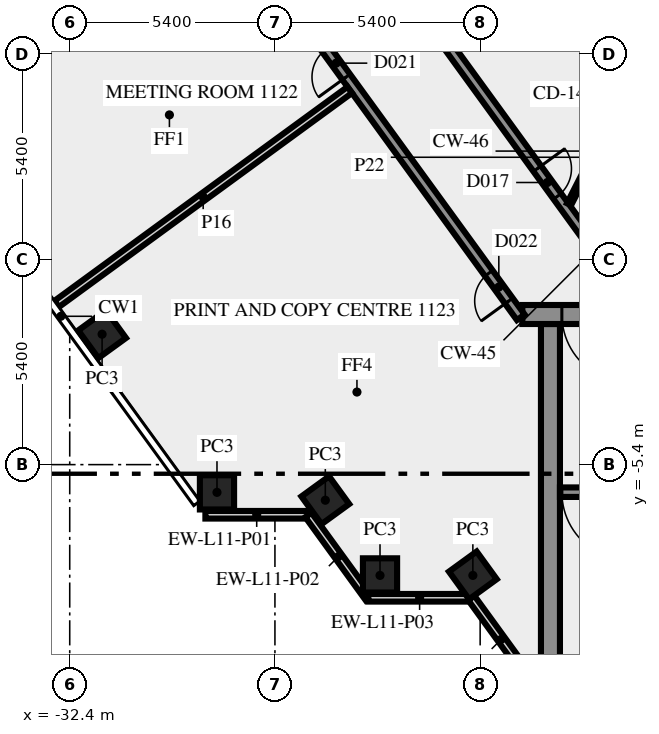
"""IFC4 building model, lengths in metres.
Left out: names, types, materials, properties, quantities, classifications, styles, units other than length and angle.
Written with IfcOpenShell. Run it as: python <this file> out.ifc"""

import sys

from ifc_helpers import new_model, si_unit, direction, frame, frame_2d, origin, origin_2d, place, context, subcontext, project, spatial, rectangle, extrude, element, fill, save


model = new_model("IFC4")
c1 = context("Model", 3, precision=1e-05, world=origin(), true_north=direction((0.0, 1.0)))
c2 = subcontext(c1, "Body", "Model", "MODEL_VIEW")
j1 = project(units=[si_unit("LENGTHUNIT", "METRE"), si_unit("PLANEANGLEUNIT", "RADIAN")], contexts=[c1])
p1 = place(None, origin())
s1 = spatial("IfcSite", under=j1, at=p1, CompositionType="ELEMENT")
p2 = place(p1, origin())
s2 = spatial("IfcBuilding", under=s1, at=p2, CompositionType="ELEMENT")
p3 = place(p2, frame((0.0, 0.0, 51.0)))
s3 = spatial("IfcBuildingStorey", under=s2, at=p3, CompositionType="ELEMENT", Elevation=51.0)
for number, where, z_axis, x_axis in (
    (1, (-31.548, -1.969, 0.0), (0.0, 0.0, 1.0), (0.588, -0.809, 0.0)),
    (2, (-28.525, -6.13, 0.0), (0.0, 0.0, 1.0), (1.0, 0.0, 0.0)),
    (3, (-25.674, -6.337, 0.0), (0.0, 0.0, 1.0), (0.588, -0.809, 0.0)),
    (4, (-24.235, -8.315, 0.0), (0.0, 0.0, 1.0), (1.0, 0.0, 0.0)),
    (5, (-21.792, -8.315, 0.0), (0.0, 0.0, 1.0), (0.588, -0.809, 0.0)),
):
    element("IfcColumn", number, at=place(p3, frame(where, z_axis=z_axis, x_axis=x_axis)), inside=s3, PredefinedType="COLUMN", context=c2, shape_type="SweptSolid", body=[
        extrude(rectangle(XDim=0.9, YDim=0.9, at=origin_2d()), origin(), (0.0, 0.0, 1.0), 3.65),
    ])
p4 = place(p3, frame((-28.83, -6.719, 0.0), z_axis=(0.0, 0.0, 1.0), x_axis=(1.0, 0.0, 0.0)))
e6 = element("IfcWall", 6, at=p4, inside=s3, PredefinedType="SOLIDWALL", context=c2, shape_type="SweptSolid", body=[
    extrude(rectangle(XDim=2.7, YDim=0.2, at=frame_2d((1.35, 0.0))), origin(), (0.0, 0.0, 1.0), 3.65),
])
p5 = place(p3, frame((-26.12, -6.724, 0.0), z_axis=(0.0, 0.0, 1.0), x_axis=(0.587720002413, -0.809064397168, 0.0)))
e7 = element("IfcWall", 7, at=p5, inside=s3, PredefinedType="SOLIDWALL", context=c2, shape_type="SweptSolid", body=[
    extrude(rectangle(XDim=2.7, YDim=0.2, at=frame_2d((1.35, 0.0))), origin(), (0.0, 0.0, 1.0), 3.65),
])
p6 = place(p3, frame((-24.543, -8.904, 0.0), z_axis=(0.0, 0.0, 1.0), x_axis=(1.0, 0.0, 0.0)))
e8 = element("IfcWall", 8, at=p6, inside=s3, PredefinedType="SOLIDWALL", context=c2, shape_type="SweptSolid", body=[
    extrude(rectangle(XDim=2.7, YDim=0.2, at=frame_2d((1.35, 0.0))), origin(), (0.0, 0.0, 1.0), 3.65),
])
p7 = place(p3, frame((-21.833, -8.909, 0.0), z_axis=(0.0, 0.0, 1.0), x_axis=(0.587766567315, -0.809030569476, 0.0)))
e9 = element("IfcWall", 9, at=p7, inside=s3, PredefinedType="SOLIDWALL", context=c2, shape_type="SweptSolid", body=[
    extrude(rectangle(XDim=2.688, YDim=0.2, at=frame_2d((1.344, 0.0))), origin(), (0.0, 0.0, 1.0), 3.65),
])
p8 = place(p3, frame((-19.75, -10.5, 0.0), z_axis=(0.0, 0.0, 1.0), x_axis=(0.0, 1.0, 0.0)))
e10 = element("IfcWall", 10, at=p8, inside=s3, PredefinedType="SHEAR", context=c2, shape_type="SweptSolid", body=[
    extrude(rectangle(XDim=8.8, YDim=0.5, at=frame_2d((4.4, 0.0))), origin(), (0.0, 0.0, 1.0), 3.65),
])
p9 = place(p3, frame((-11.45, -6.125, 0.0), z_axis=(0.0, 0.0, 1.0), x_axis=(-1.0, 0.0, 0.0)))
e11 = element("IfcWall", 11, at=p9, inside=s3, PredefinedType="SHEAR", context=c2, shape_type="SweptSolid", body=[
    extrude(rectangle(XDim=8.05, YDim=0.25, at=frame_2d((4.025, 0.0))), origin(), (0.0, 0.0, 1.0), 3.65),
])
p10 = place(p9, frame((6.2, 0.0, 0.0)))
e12 = element("IfcOpeningElement", 12, at=p10, cuts=e11, PredefinedType="OPENING", context=c2, shape_type="SweptSolid", body=[
    extrude(rectangle(XDim=1.8, YDim=2.1, at=frame_2d((0.9, 1.05))), frame((0.0, 0.135, 0.0), z_axis=(0.0, -1.0, 0.0), x_axis=(1.0, 0.0, 0.0)), (0.0, 0.0, 1.0), 0.27),
])
p11 = place(p3, frame((20.49, -1.45, 0.0), z_axis=(0.0, 0.0, 1.0), x_axis=(-1.0, 0.0, 0.0)))
e13 = element("IfcWall", 13, at=p11, inside=s3, PredefinedType="SHEAR", context=c2, shape_type="SweptSolid", body=[
    extrude(rectangle(XDim=40.98, YDim=0.5, at=frame_2d((20.49, 0.0))), origin(), (0.0, 0.0, 1.0), 3.65),
])
p12 = place(p11, frame((38.14, 0.0, 0.0)))
e14 = element("IfcOpeningElement", 14, at=p12, cuts=e13, PredefinedType="OPENING", context=c2, shape_type="SweptSolid", body=[
    extrude(rectangle(XDim=1.8, YDim=2.1, at=frame_2d((0.9, 1.05))), frame((0.0, 0.26, 0.0), z_axis=(0.0, -1.0, 0.0), x_axis=(1.0, 0.0, 0.0)), (0.0, 0.0, 1.0), 0.52),
])
p13 = place(p11, frame((35.89, 0.0, 0.0)))
e15 = element("IfcOpeningElement", 15, at=p13, cuts=e13, PredefinedType="OPENING", context=c2, shape_type="SweptSolid", body=[
    extrude(rectangle(XDim=0.9, YDim=2.1, at=frame_2d((0.45, 1.05))), frame((0.0, 0.26, 0.0), z_axis=(0.0, -1.0, 0.0), x_axis=(1.0, 0.0, 0.0)), (0.0, 0.0, 1.0), 0.52),
])
p14 = place(p11, frame((32.94, 0.0, 0.0)))
e16 = element("IfcOpeningElement", 16, at=p14, cuts=e13, PredefinedType="OPENING", context=c2, shape_type="SweptSolid", body=[
    extrude(rectangle(XDim=0.9, YDim=2.1, at=frame_2d((0.45, 1.05))), frame((0.0, 0.26, 0.0), z_axis=(0.0, -1.0, 0.0), x_axis=(1.0, 0.0, 0.0)), (0.0, 0.0, 1.0), 0.52),
])
p15 = place(p11, frame((19.59, 0.0, 0.0)))
e17 = element("IfcOpeningElement", 17, at=p15, cuts=e13, PredefinedType="OPENING", context=c2, shape_type="SweptSolid", body=[
    extrude(rectangle(XDim=2.0, YDim=2.1, at=frame_2d((1.0, 1.05))), frame((0.0, 0.26, 0.0), z_axis=(0.0, -1.0, 0.0), x_axis=(1.0, 0.0, 0.0)), (0.0, 0.0, 1.0), 0.52),
])
p16 = place(p11, frame((7.14, 0.0, 0.0)))
e18 = element("IfcOpeningElement", 18, at=p16, cuts=e13, PredefinedType="OPENING", context=c2, shape_type="SweptSolid", body=[
    extrude(rectangle(XDim=0.9, YDim=2.1, at=frame_2d((0.45, 1.05))), frame((0.0, 0.26, 0.0), z_axis=(0.0, -1.0, 0.0), x_axis=(1.0, 0.0, 0.0)), (0.0, 0.0, 1.0), 0.52),
])
p17 = place(p11, frame((5.028, 0.0, 0.0)))
e19 = element("IfcOpeningElement", 19, at=p17, cuts=e13, PredefinedType="OPENING", context=c2, shape_type="SweptSolid", body=[
    extrude(rectangle(XDim=0.8, YDim=2.1, at=frame_2d((0.4, 1.05))), frame((0.0, 0.26, 0.0), z_axis=(0.0, -1.0, 0.0), x_axis=(1.0, 0.0, 0.0)), (0.0, 0.0, 1.0), 0.52),
])
p18 = place(p11, frame((3.452, 0.0, 0.0)))
e20 = element("IfcOpeningElement", 20, at=p18, cuts=e13, PredefinedType="OPENING", context=c2, shape_type="SweptSolid", body=[
    extrude(rectangle(XDim=0.8, YDim=2.1, at=frame_2d((0.4, 1.05))), frame((0.0, 0.26, 0.0), z_axis=(0.0, -1.0, 0.0), x_axis=(1.0, 0.0, 0.0)), (0.0, 0.0, 1.0), 0.52),
])
p19 = place(p11, frame((1.04, 0.0, 0.0)))
e21 = element("IfcOpeningElement", 21, at=p19, cuts=e13, PredefinedType="OPENING", context=c2, shape_type="SweptSolid", body=[
    extrude(rectangle(XDim=1.8, YDim=2.1, at=frame_2d((0.9, 1.05))), frame((0.0, 0.26, 0.0), z_axis=(0.0, -1.0, 0.0), x_axis=(1.0, 0.0, 0.0)), (0.0, 0.0, 1.0), 0.52),
])
p20 = place(p3, frame((-20.531, -1.523, 0.0), z_axis=(0.0, 0.0, 1.0), x_axis=(-0.587784593204, 0.809017473231, 0.0)))
e22 = element("IfcWall", 22, at=p20, inside=s3, PredefinedType="SOLIDWALL", context=c2, shape_type="SweptSolid", body=[
    extrude(rectangle(XDim=44.67, YDim=0.25, at=frame_2d((22.335, 0.0))), origin(), (0.0, 0.0, 1.0), 3.65),
])
p21 = place(p20, frame((26.14, 0.0, 0.0)))
e23 = element("IfcOpeningElement", 23, at=p21, cuts=e22, PredefinedType="OPENING", context=c2, shape_type="SweptSolid", body=[
    extrude(rectangle(XDim=1.8, YDim=2.1, at=frame_2d((0.9, 1.05))), frame((0.0, 0.135, 0.0), z_axis=(0.0, -1.0, 0.0), x_axis=(1.0, 0.0, 0.0)), (0.0, 0.0, 1.0), 0.27),
])
p22 = place(p20, frame((43.296, 0.0, 0.0)))
e24 = element("IfcOpeningElement", 24, at=p22, cuts=e22, PredefinedType="OPENING", context=c2, shape_type="SweptSolid", body=[
    extrude(rectangle(XDim=0.9, YDim=2.1, at=frame_2d((0.45, 1.05))), frame((0.0, 0.135, 0.0), z_axis=(0.0, -1.0, 0.0), x_axis=(1.0, 0.0, 0.0)), (0.0, 0.0, 1.0), 0.27),
])
p23 = place(p20, frame((13.216, 0.0, 0.0)))
e25 = element("IfcOpeningElement", 25, at=p23, cuts=e22, PredefinedType="OPENING", context=c2, shape_type="SweptSolid", body=[
    extrude(rectangle(XDim=0.9, YDim=2.1, at=frame_2d((0.45, 1.05))), frame((0.0, 0.135, 0.0), z_axis=(0.0, -1.0, 0.0), x_axis=(1.0, 0.0, 0.0)), (0.0, 0.0, 1.0), 0.27),
])
p24 = place(p20, frame((7.816, 0.0, 0.0)))
e26 = element("IfcOpeningElement", 26, at=p24, cuts=e22, PredefinedType="OPENING", context=c2, shape_type="SweptSolid", body=[
    extrude(rectangle(XDim=0.9, YDim=2.1, at=frame_2d((0.45, 1.05))), frame((0.0, 0.135, 0.0), z_axis=(0.0, -1.0, 0.0), x_axis=(1.0, 0.0, 0.0)), (0.0, 0.0, 1.0), 0.27),
])
p25 = place(p20, frame((0.533, 0.0, 0.0)))
e27 = element("IfcOpeningElement", 27, at=p25, cuts=e22, PredefinedType="OPENING", context=c2, shape_type="SweptSolid", body=[
    extrude(rectangle(XDim=0.9, YDim=2.1, at=frame_2d((0.45, 1.05))), frame((0.0, 0.135, 0.0), z_axis=(0.0, -1.0, 0.0), x_axis=(1.0, 0.0, 0.0)), (0.0, 0.0, 1.0), 0.27),
])
p26 = place(p3, frame((-37.232, 25.972, 0.0), z_axis=(0.0, 0.0, 1.0), x_axis=(0.587786323093, -0.809016216391, 0.0)))
e28 = element("IfcWall", 28, at=p26, inside=s3, PredefinedType="SOLIDWALL", context=c2, shape_type="SweptSolid", body=[
    extrude(rectangle(XDim=33.493, YDim=0.25, at=frame_2d((16.747, 0.0))), origin(), (0.0, 0.0, 1.0), 3.65),
])
p27 = place(p26, frame((2.935, 0.0, 0.0)))
e29 = element("IfcOpeningElement", 29, at=p27, cuts=e28, PredefinedType="OPENING", context=c2, shape_type="SweptSolid", body=[
    extrude(rectangle(XDim=0.9, YDim=2.1, at=frame_2d((0.45, 1.05))), frame((0.0, 0.135, 0.0), z_axis=(0.0, -1.0, 0.0), x_axis=(1.0, 0.0, 0.0)), (0.0, 0.0, 1.0), 0.27),
])
p28 = place(p26, frame((16.435, 0.0, 0.0)))
e30 = element("IfcOpeningElement", 30, at=p28, cuts=e28, PredefinedType="OPENING", context=c2, shape_type="SweptSolid", body=[
    extrude(rectangle(XDim=0.9, YDim=2.1, at=frame_2d((0.45, 1.05))), frame((0.0, 0.135, 0.0), z_axis=(0.0, -1.0, 0.0), x_axis=(1.0, 0.0, 0.0)), (0.0, 0.0, 1.0), 0.27),
])
p29 = place(p26, frame((29.152, 0.0, 0.0)))
e31 = element("IfcOpeningElement", 31, at=p29, cuts=e28, PredefinedType="OPENING", context=c2, shape_type="SweptSolid", body=[
    extrude(rectangle(XDim=0.9, YDim=2.1, at=frame_2d((0.45, 1.05))), frame((0.0, 0.135, 0.0), z_axis=(0.0, -1.0, 0.0), x_axis=(1.0, 0.0, 0.0)), (0.0, 0.0, 1.0), 0.27),
])
p30 = place(p26, frame((14.536, 0.0, 0.0)))
e32 = element("IfcOpeningElement", 32, at=p30, cuts=e28, PredefinedType="OPENING", context=c2, shape_type="SweptSolid", body=[
    extrude(rectangle(XDim=1.2, YDim=2.1, at=frame_2d((0.6, 1.05))), frame((0.0, 0.135, 0.0), z_axis=(0.0, -1.0, 0.0), x_axis=(1.0, 0.0, 0.0)), (0.0, 0.0, 1.0), 0.27),
])
p31 = place(p26, frame((1.335, 0.0, 0.0)))
e33 = element("IfcOpeningElement", 33, at=p31, cuts=e28, PredefinedType="OPENING", context=c2, shape_type="SweptSolid", body=[
    extrude(rectangle(XDim=0.9, YDim=2.1, at=frame_2d((0.45, 1.05))), frame((0.0, 0.135, 0.0), z_axis=(0.0, -1.0, 0.0), x_axis=(1.0, 0.0, 0.0)), (0.0, 0.0, 1.0), 0.27),
])
p32 = place(p3, frame((-32.745, -1.173, 0.0), z_axis=(0.0, 0.0, 1.0), x_axis=(0.80760371321, 0.589725565334, 0.0)))
e34 = element("IfcWall", 34, at=p32, inside=s3, PredefinedType="SOLIDWALL", context=c2, shape_type="SweptSolid", body=[
    extrude(rectangle(XDim=9.55, YDim=0.2, at=frame_2d((4.775, 0.0))), origin(), (0.0, 0.0, 1.0), 2.75),
])
p33 = place(p3, frame((-19.261, 1.45, 0.0), z_axis=(0.0, 0.0, 1.0), x_axis=(0.453950796792, 0.891026752736, 0.0)))
e35 = element("IfcWall", 35, at=p33, inside=s3, PredefinedType="PARTITIONING", context=c2, shape_type="SweptSolid", body=[
    extrude(rectangle(XDim=2.778, YDim=0.12, at=frame_2d((1.389, 0.0))), origin(), (0.0, 0.0, 1.0), 3.65),
])
p34 = place(p10, origin())
e36 = element("IfcDoor", 36, at=p34, inside=s3, OperationType="DOUBLE_DOOR_SINGLE_SWING", PredefinedType="DOOR", context=c2, shape_type="SweptSolid", body=[
    extrude(rectangle(XDim=1.8, YDim=2.1, at=frame_2d((0.9, 1.05))), frame((0.0, 0.025, 0.0), z_axis=(0.0, -1.0, 0.0), x_axis=(1.0, 0.0, 0.0)), (0.0, 0.0, 1.0), 0.05),
])
fill(e12, e36)
p35 = place(p12, origin())
e37 = element("IfcDoor", 37, at=p35, inside=s3, OperationType="DOUBLE_DOOR_SINGLE_SWING", PredefinedType="DOOR", context=c2, shape_type="SweptSolid", body=[
    extrude(rectangle(XDim=1.8, YDim=2.1, at=frame_2d((0.9, 1.05))), frame((0.0, 0.025, 0.0), z_axis=(0.0, -1.0, 0.0), x_axis=(1.0, 0.0, 0.0)), (0.0, 0.0, 1.0), 0.05),
])
fill(e14, e37)
p36 = place(p24, origin())
e38 = element("IfcDoor", 38, at=p36, inside=s3, OperationType="SINGLE_SWING_LEFT", PredefinedType="DOOR", context=c2, shape_type="SweptSolid", body=[
    extrude(rectangle(XDim=0.9, YDim=2.1, at=frame_2d((0.45, 1.05))), frame((0.0, 0.025, 0.0), z_axis=(0.0, -1.0, 0.0), x_axis=(1.0, 0.0, 0.0)), (0.0, 0.0, 1.0), 0.05),
])
fill(e26, e38)
p37 = place(p29, origin())
e39 = element("IfcDoor", 39, at=p37, inside=s3, OperationType="SINGLE_SWING_RIGHT", PredefinedType="DOOR", context=c2, shape_type="SweptSolid", body=[
    extrude(rectangle(XDim=0.9, YDim=2.1, at=frame_2d((0.45, 1.05))), frame((0.0, 0.025, 0.0), z_axis=(0.0, -1.0, 0.0), x_axis=(1.0, 0.0, 0.0)), (0.0, 0.0, 1.0), 0.05),
])
fill(e31, e39)
p38 = place(p25, origin())
e40 = element("IfcDoor", 40, at=p38, inside=s3, OperationType="SINGLE_SWING_LEFT", PredefinedType="DOOR", context=c2, shape_type="SweptSolid", body=[
    extrude(rectangle(XDim=0.9, YDim=2.1, at=frame_2d((0.45, 1.05))), frame((0.0, 0.025, 0.0), z_axis=(0.0, -1.0, 0.0), x_axis=(1.0, 0.0, 0.0)), (0.0, 0.0, 1.0), 0.05),
])
fill(e27, e40)
save(model, sys.argv[1])
